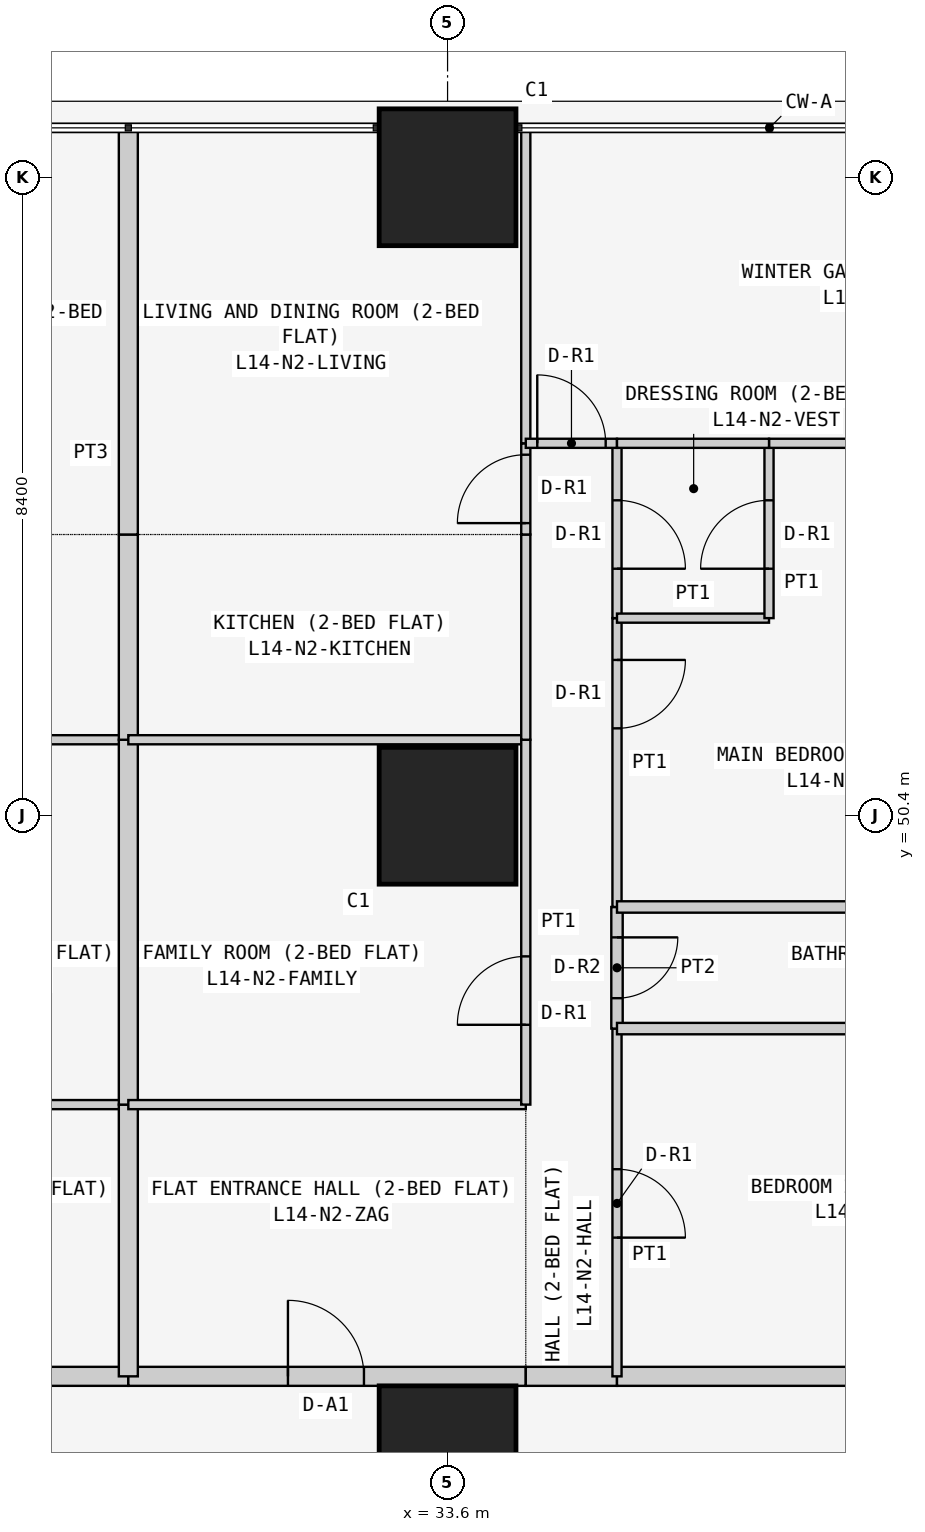
"""IFC4 building model, lengths in metres.
Left out: names, types, materials, properties, quantities, classifications, styles, units other than length and angle.
Written with IfcOpenShell. Run it as: python <this file> out.ifc"""

import sys

from ifc_helpers import new_model, si_unit, direction, frame, frame_2d, origin, origin_2d, place, context, subcontext, project, spatial, rectangle, extrude, element, fill, save


model = new_model("IFC4")
c1 = context("Model", 3, precision=1e-05, world=origin(), true_north=direction((0.0, 1.0)))
c2 = subcontext(c1, "Body", "Model", "MODEL_VIEW")
j1 = project(units=[si_unit("LENGTHUNIT", "METRE"), si_unit("PLANEANGLEUNIT", "RADIAN")], contexts=[c1])
p1 = place(None, origin())
s1 = spatial("IfcSite", under=j1, at=p1, CompositionType="ELEMENT")
p2 = place(p1, origin())
s2 = spatial("IfcBuilding", under=s1, at=p2, CompositionType="ELEMENT")
p3 = place(p2, frame((0.0, 0.0, 59.7)))
s3 = spatial("IfcBuildingStorey", under=s2, at=p3, CompositionType="ELEMENT", Elevation=59.7)
for number, where, z_axis, x_axis in (
    (1, (33.6, 42.0, 0.0), (0.0, 0.0, 1.0), (1.0, 0.0, 0.0)),
    (2, (33.6, 50.4, 0.0), (0.0, 0.0, 1.0), (1.0, 0.0, 0.0)),
    (3, (33.6, 58.8, 0.0), (0.0, 0.0, 1.0), (1.0, 0.0, 0.0)),
):
    element("IfcColumn", number, at=place(p3, frame(where, z_axis=z_axis, x_axis=x_axis)), inside=s3, PredefinedType="COLUMN", context=c2, shape_type="SweptSolid", body=[
        extrude(rectangle(XDim=1.8, YDim=1.8, at=origin_2d()), origin(), (0.0, 0.0, 1.0), 3.6),
    ])
p4 = place(p3, frame((24.171, 43.025, 0.0), z_axis=(0.0, 0.0, 1.0), x_axis=(1.0, 0.0, 0.0)))
e4 = element("IfcWall", 4, at=p4, inside=s3, PredefinedType="PARTITIONING", context=c2, shape_type="SweptSolid", body=[
    extrude(rectangle(XDim=5.229, YDim=0.25, at=frame_2d((2.615, 0.0))), origin(), (0.0, 0.0, 1.0), 3.45),
])
p5 = place(p4, frame((2.129, 0.0, 0.0)))
e5 = element("IfcOpeningElement", 5, at=p5, cuts=e4, PredefinedType="OPENING", context=c2, shape_type="SweptSolid", body=[
    extrude(rectangle(XDim=1.0, YDim=2.1, at=frame_2d((0.5, 1.05))), frame((0.0, 0.135, 0.0), z_axis=(0.0, -1.0, 0.0), x_axis=(1.0, 0.0, 0.0)), (0.0, 0.0, 1.0), 0.27),
])
p6 = place(p3, frame((29.4, 43.025, 0.0), z_axis=(0.0, 0.0, 1.0), x_axis=(1.0, 0.0, 0.0)))
e6 = element("IfcWall", 6, at=p6, inside=s3, PredefinedType="PARTITIONING", context=c2, shape_type="SweptSolid", body=[
    extrude(rectangle(XDim=5.229, YDim=0.25, at=frame_2d((2.615, 0.0))), origin(), (0.0, 0.0, 1.0), 3.45),
])
p7 = place(p6, frame((2.1, 0.0, 0.0)))
e7 = element("IfcOpeningElement", 7, at=p7, cuts=e6, PredefinedType="OPENING", context=c2, shape_type="SweptSolid", body=[
    extrude(rectangle(XDim=1.0, YDim=2.1, at=frame_2d((0.5, 1.05))), frame((0.0, 0.135, 0.0), z_axis=(0.0, -1.0, 0.0), x_axis=(1.0, 0.0, 0.0)), (0.0, 0.0, 1.0), 0.27),
])
p8 = place(p3, frame((34.629, 43.025, 0.0), z_axis=(0.0, 0.0, 1.0), x_axis=(1.0, 0.0, 0.0)))
e8 = element("IfcWall", 8, at=p8, inside=s3, PredefinedType="PARTITIONING", context=c2, shape_type="SweptSolid", body=[
    extrude(rectangle(XDim=1.2, YDim=0.25, at=frame_2d((0.6, 0.0))), origin(), (0.0, 0.0, 1.0), 3.45),
])
p9 = place(p3, frame((35.829, 43.025, 0.0), z_axis=(0.0, 0.0, 1.0), x_axis=(1.0, 0.0, 0.0)))
e9 = element("IfcWall", 9, at=p9, inside=s3, PredefinedType="PARTITIONING", context=c2, shape_type="SweptSolid", body=[
    extrude(rectangle(XDim=6.871, YDim=0.25, at=frame_2d((3.436, 0.0))), origin(), (0.0, 0.0, 1.0), 3.45),
])
p10 = place(p3, frame((29.4, 46.6, 0.0), z_axis=(0.0, 0.0, 1.0), x_axis=(-1.0, 0.0, 0.0)))
e10 = element("IfcWall", 10, at=p10, inside=s3, PredefinedType="PARTITIONING", context=c2, shape_type="SweptSolid", body=[
    extrude(rectangle(XDim=5.229, YDim=0.12, at=frame_2d((2.615, 0.0))), origin(), (0.0, 0.0, 1.0), 3.45),
])
p11 = place(p3, frame((29.4, 43.025, 0.0), z_axis=(0.0, 0.0, 1.0), x_axis=(0.0, 1.0, 0.0)))
e11 = element("IfcWall", 11, at=p11, inside=s3, PredefinedType="PARTITIONING", context=c2, shape_type="SweptSolid", body=[
    extrude(rectangle(XDim=3.575, YDim=0.25, at=frame_2d((1.788, 0.0))), origin(), (0.0, 0.0, 1.0), 2.848),
])
p12 = place(p3, frame((29.4, 51.4, 0.0), z_axis=(0.0, 0.0, 1.0), x_axis=(-1.0, 0.0, 0.0)))
e12 = element("IfcWall", 12, at=p12, inside=s3, PredefinedType="PARTITIONING", context=c2, shape_type="SweptSolid", body=[
    extrude(rectangle(XDim=5.229, YDim=0.12, at=frame_2d((2.615, 0.0))), origin(), (0.0, 0.0, 1.0), 3.45),
])
p13 = place(p3, frame((29.4, 46.6, 0.0), z_axis=(0.0, 0.0, 1.0), x_axis=(0.0, 1.0, 0.0)))
e13 = element("IfcWall", 13, at=p13, inside=s3, PredefinedType="PARTITIONING", context=c2, shape_type="SweptSolid", body=[
    extrude(rectangle(XDim=4.8, YDim=0.25, at=frame_2d((2.4, 0.0))), origin(), (0.0, 0.0, 1.0), 2.848),
])
p14 = place(p3, frame((29.4, 51.4, 0.0), z_axis=(0.0, 0.0, 1.0), x_axis=(0.0, 1.0, 0.0)))
e14 = element("IfcWall", 14, at=p14, inside=s3, PredefinedType="PARTITIONING", context=c2, shape_type="SweptSolid", body=[
    extrude(rectangle(XDim=2.7, YDim=0.25, at=frame_2d((1.35, 0.0))), origin(), (0.0, 0.0, 1.0), 2.848),
])
p15 = place(p3, frame((29.4, 54.1, 0.0), z_axis=(0.0, 0.0, 1.0), x_axis=(0.0, 1.0, 0.0)))
e15 = element("IfcWall", 15, at=p15, inside=s3, PredefinedType="PARTITIONING", context=c2, shape_type="SweptSolid", body=[
    extrude(rectangle(XDim=5.35, YDim=0.25, at=frame_2d((2.675, 0.0))), origin(), (0.0, 0.0, 1.0), 2.848),
])
for number, where, z_axis, x_axis in (
    (16, (29.4, 46.6, 0.0), (0.0, 0.0, 1.0), (1.0, 0.0, 0.0)),
    (17, (29.4, 51.4, 0.0), (0.0, 0.0, 1.0), (1.0, 0.0, 0.0)),
):
    element("IfcWall", number, at=place(p3, frame(where, z_axis=z_axis, x_axis=x_axis)), inside=s3, PredefinedType="PARTITIONING", context=c2, shape_type="SweptSolid", body=[
        extrude(rectangle(XDim=5.229, YDim=0.12, at=frame_2d((2.615, 0.0))), origin(), (0.0, 0.0, 1.0), 3.45),
    ])
p16 = place(p3, frame((34.629, 51.4, 0.0), z_axis=(0.0, 0.0, 1.0), x_axis=(0.0, -1.0, 0.0)))
e18 = element("IfcWall", 18, at=p16, inside=s3, PredefinedType="PARTITIONING", context=c2, shape_type="SweptSolid", body=[
    extrude(rectangle(XDim=4.8, YDim=0.12, at=frame_2d((2.4, 0.0))), origin(), (0.0, 0.0, 1.0), 3.45),
])
p17 = place(p16, frame((2.85, 0.0, 0.0)))
e19 = element("IfcOpeningElement", 19, at=p17, cuts=e18, PredefinedType="OPENING", context=c2, shape_type="SweptSolid", body=[
    extrude(rectangle(XDim=0.9, YDim=2.1, at=frame_2d((0.45, 1.05))), frame((0.0, 0.07, 0.0), z_axis=(0.0, -1.0, 0.0), x_axis=(1.0, 0.0, 0.0)), (0.0, 0.0, 1.0), 0.14),
])
p18 = place(p3, frame((34.629, 54.1, 0.0), z_axis=(0.0, 0.0, 1.0), x_axis=(0.0, -1.0, 0.0)))
e20 = element("IfcWall", 20, at=p18, inside=s3, PredefinedType="PARTITIONING", context=c2, shape_type="SweptSolid", body=[
    extrude(rectangle(XDim=2.7, YDim=0.12, at=frame_2d((1.35, 0.0))), origin(), (0.0, 0.0, 1.0), 3.45),
])
p19 = place(p3, frame((34.629, 55.3, 0.0), z_axis=(0.0, 0.0, 1.0), x_axis=(0.0, -1.0, 0.0)))
e21 = element("IfcWall", 21, at=p19, inside=s3, PredefinedType="PARTITIONING", context=c2, shape_type="SweptSolid", body=[
    extrude(rectangle(XDim=1.2, YDim=0.12, at=frame_2d((0.6, 0.0))), origin(), (0.0, 0.0, 1.0), 3.45),
])
p20 = place(p19, frame((0.15, 0.0, 0.0)))
e22 = element("IfcOpeningElement", 22, at=p20, cuts=e21, PredefinedType="OPENING", context=c2, shape_type="SweptSolid", body=[
    extrude(rectangle(XDim=0.9, YDim=2.1, at=frame_2d((0.45, 1.05))), frame((0.0, 0.07, 0.0), z_axis=(0.0, -1.0, 0.0), x_axis=(1.0, 0.0, 0.0)), (0.0, 0.0, 1.0), 0.14),
])
p21 = place(p3, frame((34.629, 59.45, 0.0), z_axis=(0.0, 0.0, 1.0), x_axis=(0.0, -1.0, 0.0)))
e23 = element("IfcWall", 23, at=p21, inside=s3, PredefinedType="PARTITIONING", context=c2, shape_type="SweptSolid", body=[
    extrude(rectangle(XDim=4.15, YDim=0.12, at=frame_2d((2.075, 0.0))), origin(), (0.0, 0.0, 1.0), 3.45),
])
p22 = place(p3, frame((35.829, 47.6, 0.0), z_axis=(0.0, 0.0, 1.0), x_axis=(0.0, -1.0, 0.0)))
e24 = element("IfcWall", 24, at=p22, inside=s3, PredefinedType="PARTITIONING", context=c2, shape_type="SweptSolid", body=[
    extrude(rectangle(XDim=4.575, YDim=0.12, at=frame_2d((2.288, 0.0))), origin(), (0.0, 0.0, 1.0), 3.45),
])
p23 = place(p22, frame((1.85, 0.0, 0.0)))
e25 = element("IfcOpeningElement", 25, at=p23, cuts=e24, PredefinedType="OPENING", context=c2, shape_type="SweptSolid", body=[
    extrude(rectangle(XDim=0.9, YDim=2.1, at=frame_2d((0.45, 1.05))), frame((0.0, 0.07, 0.0), z_axis=(0.0, -1.0, 0.0), x_axis=(1.0, 0.0, 0.0)), (0.0, 0.0, 1.0), 0.14),
])
p24 = place(p3, frame((35.829, 49.2, 0.0), z_axis=(0.0, 0.0, 1.0), x_axis=(0.0, -1.0, 0.0)))
e26 = element("IfcWall", 26, at=p24, inside=s3, PredefinedType="PARTITIONING", context=c2, shape_type="SweptSolid", body=[
    extrude(rectangle(XDim=1.6, YDim=0.15, at=frame_2d((0.8, 0.0))), origin(), (0.0, 0.0, 1.0), 3.45),
])
p25 = place(p24, frame((0.4, 0.0, 0.0)))
e27 = element("IfcOpeningElement", 27, at=p25, cuts=e26, PredefinedType="OPENING", context=c2, shape_type="SweptSolid", body=[
    extrude(rectangle(XDim=0.8, YDim=2.1, at=frame_2d((0.4, 1.05))), frame((0.0, 0.085, 0.0), z_axis=(0.0, -1.0, 0.0), x_axis=(1.0, 0.0, 0.0)), (0.0, 0.0, 1.0), 0.17),
])
p26 = place(p3, frame((35.829, 53.0, 0.0), z_axis=(0.0, 0.0, 1.0), x_axis=(0.0, -1.0, 0.0)))
e28 = element("IfcWall", 28, at=p26, inside=s3, PredefinedType="PARTITIONING", context=c2, shape_type="SweptSolid", body=[
    extrude(rectangle(XDim=3.8, YDim=0.12, at=frame_2d((1.9, 0.0))), origin(), (0.0, 0.0, 1.0), 3.45),
])
p27 = place(p26, frame((0.55, 0.0, 0.0)))
e29 = element("IfcOpeningElement", 29, at=p27, cuts=e28, PredefinedType="OPENING", context=c2, shape_type="SweptSolid", body=[
    extrude(rectangle(XDim=0.9, YDim=2.1, at=frame_2d((0.45, 1.05))), frame((0.0, 0.07, 0.0), z_axis=(0.0, -1.0, 0.0), x_axis=(1.0, 0.0, 0.0)), (0.0, 0.0, 1.0), 0.14),
])
p28 = place(p3, frame((35.829, 55.3, 0.0), z_axis=(0.0, 0.0, 1.0), x_axis=(0.0, -1.0, 0.0)))
e30 = element("IfcWall", 30, at=p28, inside=s3, PredefinedType="PARTITIONING", context=c2, shape_type="SweptSolid", body=[
    extrude(rectangle(XDim=2.3, YDim=0.12, at=frame_2d((1.15, 0.0))), origin(), (0.0, 0.0, 1.0), 3.45),
])
p29 = place(p28, frame((0.75, 0.0, 0.0)))
e31 = element("IfcOpeningElement", 31, at=p29, cuts=e30, PredefinedType="OPENING", context=c2, shape_type="SweptSolid", body=[
    extrude(rectangle(XDim=0.9, YDim=2.1, at=frame_2d((0.45, 1.05))), frame((0.0, 0.07, 0.0), z_axis=(0.0, -1.0, 0.0), x_axis=(1.0, 0.0, 0.0)), (0.0, 0.0, 1.0), 0.14),
])
p30 = place(p3, frame((34.629, 55.3, 0.0), z_axis=(0.0, 0.0, 1.0), x_axis=(1.0, 0.0, 0.0)))
e32 = element("IfcWall", 32, at=p30, inside=s3, PredefinedType="PARTITIONING", context=c2, shape_type="SweptSolid", body=[
    extrude(rectangle(XDim=1.2, YDim=0.12, at=frame_2d((0.6, 0.0))), origin(), (0.0, 0.0, 1.0), 3.45),
])
p31 = place(p30, frame((0.151, 0.0, 0.0)))
e33 = element("IfcOpeningElement", 33, at=p31, cuts=e32, PredefinedType="OPENING", context=c2, shape_type="SweptSolid", body=[
    extrude(rectangle(XDim=0.9, YDim=2.1, at=frame_2d((0.45, 1.05))), frame((0.0, 0.07, 0.0), z_axis=(0.0, -1.0, 0.0), x_axis=(1.0, 0.0, 0.0)), (0.0, 0.0, 1.0), 0.14),
])
for number, where, z_axis, x_axis in (
    (34, (35.829, 47.6, 0.0), (0.0, 0.0, 1.0), (1.0, 0.0, 0.0)),
    (35, (35.829, 49.2, 0.0), (0.0, 0.0, 1.0), (1.0, 0.0, 0.0)),
):
    element("IfcWall", number, at=place(p3, frame(where, z_axis=z_axis, x_axis=x_axis)), inside=s3, PredefinedType="PARTITIONING", context=c2, shape_type="SweptSolid", body=[
        extrude(rectangle(XDim=6.871, YDim=0.15, at=frame_2d((3.436, 0.0))), origin(), (0.0, 0.0, 1.0), 3.45),
    ])
p32 = place(p3, frame((35.829, 53.0, 0.0), z_axis=(0.0, 0.0, 1.0), x_axis=(1.0, 0.0, 0.0)))
e36 = element("IfcWall", 36, at=p32, inside=s3, PredefinedType="PARTITIONING", context=c2, shape_type="SweptSolid", body=[
    extrude(rectangle(XDim=2.0, YDim=0.12, at=frame_2d((1.0, 0.0))), origin(), (0.0, 0.0, 1.0), 3.45),
])
p33 = place(p3, frame((37.829, 53.0, 0.0), z_axis=(0.0, 0.0, 1.0), x_axis=(0.0, 1.0, 0.0)))
e37 = element("IfcWall", 37, at=p33, inside=s3, PredefinedType="PARTITIONING", context=c2, shape_type="SweptSolid", body=[
    extrude(rectangle(XDim=2.3, YDim=0.12, at=frame_2d((1.15, 0.0))), origin(), (0.0, 0.0, 1.0), 2.848),
])
p34 = place(p33, frame((0.65, 0.0, 0.0)))
e38 = element("IfcOpeningElement", 38, at=p34, cuts=e37, PredefinedType="OPENING", context=c2, shape_type="SweptSolid", body=[
    extrude(rectangle(XDim=0.9, YDim=2.1, at=frame_2d((0.45, 1.05))), frame((0.0, 0.07, 0.0), z_axis=(0.0, -1.0, 0.0), x_axis=(1.0, 0.0, 0.0)), (0.0, 0.0, 1.0), 0.14),
])
p35 = place(p3, frame((37.829, 55.3, 0.0), z_axis=(0.0, 0.0, 1.0), x_axis=(1.0, 0.0, 0.0)))
e39 = element("IfcWall", 39, at=p35, inside=s3, PredefinedType="PARTITIONING", context=c2, shape_type="SweptSolid", body=[
    extrude(rectangle(XDim=4.871, YDim=0.12, at=frame_2d((2.436, 0.0))), origin(), (0.0, 0.0, 1.0), 3.45),
])
p36 = place(p3, frame((35.829, 55.3, 0.0), z_axis=(0.0, 0.0, 1.0), x_axis=(1.0, 0.0, 0.0)))
e40 = element("IfcWall", 40, at=p36, inside=s3, PredefinedType="PARTITIONING", context=c2, shape_type="SweptSolid", body=[
    extrude(rectangle(XDim=2.0, YDim=0.12, at=frame_2d((1.0, 0.0))), origin(), (0.0, 0.0, 1.0), 3.45),
])
p37 = place(p7, origin())
e41 = element("IfcDoor", 41, at=p37, inside=s3, OperationType="SINGLE_SWING_LEFT", PredefinedType="DOOR", context=c2, shape_type="SweptSolid", body=[
    extrude(rectangle(XDim=1.0, YDim=2.1, at=frame_2d((0.5, 1.05))), frame((0.0, 0.025, 0.0), z_axis=(0.0, -1.0, 0.0), x_axis=(1.0, 0.0, 0.0)), (0.0, 0.0, 1.0), 0.05),
])
fill(e7, e41)
p38 = place(p17, frame((0.9, 0.0, 0.0), z_axis=(0.0, 0.0, 1.0), x_axis=(-1.0, 0.0, 0.0)))
e42 = element("IfcDoor", 42, at=p38, inside=s3, OperationType="SINGLE_SWING_LEFT", PredefinedType="DOOR", context=c2, shape_type="SweptSolid", body=[
    extrude(rectangle(XDim=0.9, YDim=2.1, at=frame_2d((0.45, 1.05))), frame((0.0, 0.025, 0.0), z_axis=(0.0, -1.0, 0.0), x_axis=(1.0, 0.0, 0.0)), (0.0, 0.0, 1.0), 0.05),
])
fill(e19, e42)
p39 = place(p20, frame((0.9, 0.0, 0.0), z_axis=(0.0, 0.0, 1.0), x_axis=(-1.0, 0.0, 0.0)))
e43 = element("IfcDoor", 43, at=p39, inside=s3, OperationType="SINGLE_SWING_LEFT", PredefinedType="DOOR", context=c2, shape_type="SweptSolid", body=[
    extrude(rectangle(XDim=0.9, YDim=2.1, at=frame_2d((0.45, 1.05))), frame((0.0, 0.025, 0.0), z_axis=(0.0, -1.0, 0.0), x_axis=(1.0, 0.0, 0.0)), (0.0, 0.0, 1.0), 0.05),
])
fill(e22, e43)
p40 = place(p23, origin())
e44 = element("IfcDoor", 44, at=p40, inside=s3, OperationType="SINGLE_SWING_RIGHT", PredefinedType="DOOR", context=c2, shape_type="SweptSolid", body=[
    extrude(rectangle(XDim=0.9, YDim=2.1, at=frame_2d((0.45, 1.05))), frame((0.0, 0.025, 0.0), z_axis=(0.0, -1.0, 0.0), x_axis=(1.0, 0.0, 0.0)), (0.0, 0.0, 1.0), 0.05),
])
fill(e25, e44)
p41 = place(p25, origin())
e45 = element("IfcDoor", 45, at=p41, inside=s3, OperationType="SINGLE_SWING_LEFT", PredefinedType="DOOR", context=c2, shape_type="SweptSolid", body=[
    extrude(rectangle(XDim=0.8, YDim=2.1, at=frame_2d((0.4, 1.05))), frame((0.0, 0.025, 0.0), z_axis=(0.0, -1.0, 0.0), x_axis=(1.0, 0.0, 0.0)), (0.0, 0.0, 1.0), 0.05),
])
fill(e27, e45)
p42 = place(p27, origin())
e46 = element("IfcDoor", 46, at=p42, inside=s3, OperationType="SINGLE_SWING_LEFT", PredefinedType="DOOR", context=c2, shape_type="SweptSolid", body=[
    extrude(rectangle(XDim=0.9, YDim=2.1, at=frame_2d((0.45, 1.05))), frame((0.0, 0.025, 0.0), z_axis=(0.0, -1.0, 0.0), x_axis=(1.0, 0.0, 0.0)), (0.0, 0.0, 1.0), 0.05),
])
fill(e29, e46)
p43 = place(p29, origin())
e47 = element("IfcDoor", 47, at=p43, inside=s3, OperationType="SINGLE_SWING_RIGHT", PredefinedType="DOOR", context=c2, shape_type="SweptSolid", body=[
    extrude(rectangle(XDim=0.9, YDim=2.1, at=frame_2d((0.45, 1.05))), frame((0.0, 0.025, 0.0), z_axis=(0.0, -1.0, 0.0), x_axis=(1.0, 0.0, 0.0)), (0.0, 0.0, 1.0), 0.05),
])
fill(e31, e47)
p44 = place(p34, origin())
e48 = element("IfcDoor", 48, at=p44, inside=s3, OperationType="SINGLE_SWING_LEFT", PredefinedType="DOOR", context=c2, shape_type="SweptSolid", body=[
    extrude(rectangle(XDim=0.9, YDim=2.1, at=frame_2d((0.45, 1.05))), frame((0.0, 0.025, 0.0), z_axis=(0.0, -1.0, 0.0), x_axis=(1.0, 0.0, 0.0)), (0.0, 0.0, 1.0), 0.05),
])
fill(e38, e48)
p45 = place(p31, origin())
e49 = element("IfcDoor", 49, at=p45, inside=s3, OperationType="SINGLE_SWING_LEFT", PredefinedType="DOOR", context=c2, shape_type="SweptSolid", body=[
    extrude(rectangle(XDim=0.9, YDim=2.1, at=frame_2d((0.45, 1.05))), frame((0.0, 0.025, 0.0), z_axis=(0.0, -1.0, 0.0), x_axis=(1.0, 0.0, 0.0)), (0.0, 0.0, 1.0), 0.05),
])
fill(e33, e49)
save(model, sys.argv[1])
